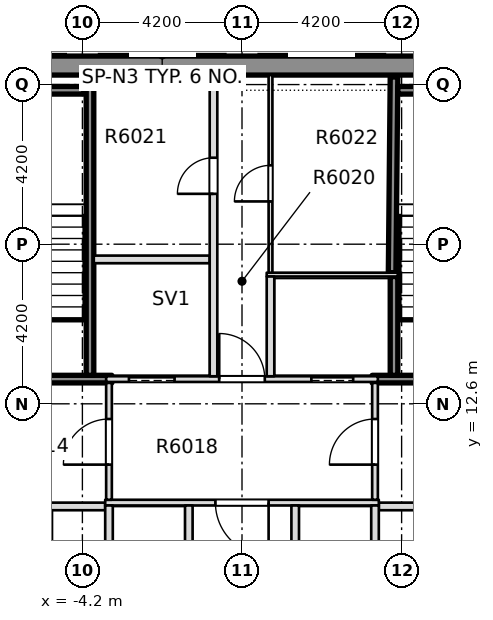
"""IFC4 building model, lengths in metres.
Left out: names, types, materials, properties, quantities, classifications, styles, units other than length and angle.
Written with IfcOpenShell. Run it as: python <this file> out.ifc"""

import sys

from ifc_helpers import new_model, si_unit, direction, frame, frame_2d, origin, place, context, subcontext, project, spatial, rectangle, extrude, element, fill, save


model = new_model("IFC4")
c1 = context("Model", 3, precision=1e-05, world=origin(), true_north=direction((0.0, 1.0)))
c2 = subcontext(c1, "Body", "Model", "MODEL_VIEW")
j1 = project(units=[si_unit("LENGTHUNIT", "METRE"), si_unit("PLANEANGLEUNIT", "RADIAN")], contexts=[c1])
p1 = place(None, origin())
s1 = spatial("IfcSite", under=j1, at=p1, CompositionType="ELEMENT")
p2 = place(p1, origin())
s2 = spatial("IfcBuilding", under=s1, at=p2, CompositionType="ELEMENT")
p3 = place(p2, frame((0.0, 0.0, 230.35)))
s3 = spatial("IfcBuildingStorey", under=s2, at=p3, CompositionType="ELEMENT", Elevation=230.35)
p4 = place(p3, frame((-12.1, 21.5, -0.4), z_axis=(0.0, 0.0, 1.0), x_axis=(1.0, 0.0, 0.0)))
e1 = element("IfcWall", 1, at=p4, inside=s3, PredefinedType="SHEAR", context=c2, shape_type="SweptSolid", body=[
    extrude(rectangle(XDim=24.2, YDim=0.5, at=frame_2d((12.1, 0.0))), origin(), (0.0, 0.0, 1.0), 3.45),
])
p5 = place(p3, frame((-7.5, 9.9, 0.0), z_axis=(0.0, 0.0, 1.0), x_axis=(1.0, 0.0, 0.0)))
e2 = element("IfcWall", 2, at=p5, inside=s3, PredefinedType="PARTITIONING", context=c2, shape_type="SweptSolid", body=[
    extrude(rectangle(XDim=3.9, YDim=0.2, at=frame_2d((1.95, 0.0))), origin(), (0.0, 0.0, 1.0), 3.05),
])
p6 = place(p5, frame((0.55, 0.0, 0.0)))
e3 = element("IfcOpeningElement", 3, at=p6, cuts=e2, PredefinedType="OPENING", context=c2, shape_type="SweptSolid", body=[
    extrude(rectangle(XDim=1.1, YDim=2.1, at=frame_2d((0.55, 1.05))), frame((0.0, 0.11, 0.0), z_axis=(0.0, -1.0, 0.0), x_axis=(1.0, 0.0, 0.0)), (0.0, 0.0, 1.0), 0.22),
])
p7 = place(p3, frame((3.6, 9.9, 0.0), z_axis=(0.0, 0.0, 1.0), x_axis=(1.0, 0.0, 0.0)))
e4 = element("IfcWall", 4, at=p7, inside=s3, PredefinedType="PARTITIONING", context=c2, shape_type="SweptSolid", body=[
    extrude(rectangle(XDim=3.9, YDim=0.2, at=frame_2d((1.95, 0.0))), origin(), (0.0, 0.0, 1.0), 3.05),
])
p8 = place(p7, frame((2.25, 0.0, 0.0)))
e5 = element("IfcOpeningElement", 5, at=p8, cuts=e4, PredefinedType="OPENING", context=c2, shape_type="SweptSolid", body=[
    extrude(rectangle(XDim=1.1, YDim=2.1, at=frame_2d((0.55, 1.05))), frame((0.0, 0.11, 0.0), z_axis=(0.0, -1.0, 0.0), x_axis=(1.0, 0.0, 0.0)), (0.0, 0.0, 1.0), 0.22),
])
p9 = place(p3, frame((-3.6, 10.0, 0.0), z_axis=(0.0, 0.0, 1.0), x_axis=(1.0, 0.0, 0.0)))
e6 = element("IfcWall", 6, at=p9, inside=s3, PredefinedType="PARTITIONING", context=c2, shape_type="SweptSolid", body=[
    extrude(rectangle(XDim=7.2, YDim=0.15, at=frame_2d((3.6, 0.0))), origin(), (0.0, 0.0, 1.0), 3.05),
])
p10 = place(p9, frame((2.9, 0.0, 0.0)))
e7 = element("IfcOpeningElement", 7, at=p10, cuts=e6, PredefinedType="OPENING", context=c2, shape_type="SweptSolid", body=[
    extrude(rectangle(XDim=1.4, YDim=2.1, at=frame_2d((0.7, 1.05))), frame((0.0, 0.085, 0.0), z_axis=(0.0, -1.0, 0.0), x_axis=(1.0, 0.0, 0.0)), (0.0, 0.0, 1.0), 0.17),
])
p11 = place(p3, frame((-7.5, 13.25, 0.0), z_axis=(0.0, 0.0, 1.0), x_axis=(1.0, 0.0, 0.0)))
e8 = element("IfcWall", 8, at=p11, inside=s3, PredefinedType="SOLIDWALL", context=c2, shape_type="SweptSolid", body=[
    extrude(rectangle(XDim=4.075, YDim=0.2, at=frame_2d((2.038, 0.0))), origin(), (0.0, 0.0, 1.0), 3.05),
])
p12 = place(p11, frame((1.05, 0.0, 0.0)))
e9 = element("IfcOpeningElement", 9, at=p12, cuts=e8, PredefinedType="OPENING", context=c2, shape_type="SweptSolid", body=[
    extrude(rectangle(XDim=1.2, YDim=2.1, at=frame_2d((0.6, 1.05))), frame((0.0, 0.11, 0.0), z_axis=(0.0, -1.0, 0.0), x_axis=(1.0, 0.0, 0.0)), (0.0, 0.0, 1.0), 0.22),
])
p13 = place(p3, frame((-3.575, 13.25, 0.0), z_axis=(0.0, 0.0, 1.0), x_axis=(1.0, 0.0, 0.0)))
e10 = element("IfcWall", 10, at=p13, inside=s3, PredefinedType="PARTITIONING", context=c2, shape_type="SweptSolid", body=[
    extrude(rectangle(XDim=7.15, YDim=0.15, at=frame_2d((3.575, 0.0))), origin(), (0.0, 0.0, 1.0), 3.05),
])
p14 = place(p13, frame((0.6, 0.0, 0.0)))
e11 = element("IfcOpeningElement", 11, at=p14, cuts=e10, PredefinedType="OPENING", context=c2, shape_type="SweptSolid", body=[
    extrude(rectangle(XDim=1.2, YDim=2.1, at=frame_2d((0.6, 1.05))), frame((0.0, 0.085, 0.0), z_axis=(0.0, -1.0, 0.0), x_axis=(1.0, 0.0, 0.0)), (0.0, 0.0, 1.0), 0.17),
])
p15 = place(p13, frame((5.4, 0.0, 0.0)))
e12 = element("IfcOpeningElement", 12, at=p15, cuts=e10, PredefinedType="OPENING", context=c2, shape_type="SweptSolid", body=[
    extrude(rectangle(XDim=1.1, YDim=2.1, at=frame_2d((0.55, 1.05))), frame((0.0, 0.085, 0.0), z_axis=(0.0, -1.0, 0.0), x_axis=(1.0, 0.0, 0.0)), (0.0, 0.0, 1.0), 0.17),
])
p16 = place(p13, frame((2.975, 0.0, 0.0)))
e13 = element("IfcOpeningElement", 13, at=p16, cuts=e10, PredefinedType="OPENING", context=c2, shape_type="SweptSolid", body=[
    extrude(rectangle(XDim=1.2, YDim=2.1, at=frame_2d((0.6, 1.05))), frame((0.0, 0.085, 0.0), z_axis=(0.0, -1.0, 0.0), x_axis=(1.0, 0.0, 0.0)), (0.0, 0.0, 1.0), 0.17),
])
p17 = place(p3, frame((3.425, 13.25, 0.0), z_axis=(0.0, 0.0, 1.0), x_axis=(1.0, 0.0, 0.0)))
e14 = element("IfcWall", 14, at=p17, inside=s3, PredefinedType="SOLIDWALL", context=c2, shape_type="SweptSolid", body=[
    extrude(rectangle(XDim=4.075, YDim=0.2, at=frame_2d((2.038, 0.0))), origin(), (0.0, 0.0, 1.0), 3.05),
])
p18 = place(p17, frame((1.825, 0.0, 0.0)))
e15 = element("IfcOpeningElement", 15, at=p18, cuts=e14, PredefinedType="OPENING", context=c2, shape_type="SweptSolid", body=[
    extrude(rectangle(XDim=1.2, YDim=2.1, at=frame_2d((0.6, 1.05))), frame((0.0, 0.11, 0.0), z_axis=(0.0, -1.0, 0.0), x_axis=(1.0, 0.0, 0.0)), (0.0, 0.0, 1.0), 0.22),
])
p19 = place(p3, frame((0.65, 16.0, 0.0), z_axis=(0.0, 0.0, 1.0), x_axis=(1.0, 0.0, 0.0)))
e16 = element("IfcWall", 16, at=p19, inside=s3, PredefinedType="PARTITIONING", context=c2, shape_type="SweptSolid", body=[
    extrude(rectangle(XDim=3.45, YDim=0.1, at=frame_2d((1.725, 0.0))), origin(), (0.0, 0.0, 1.0), 3.05),
])
p20 = place(p3, frame((-3.9, 16.4, 0.0), z_axis=(0.0, 0.0, 1.0), x_axis=(1.0, 0.0, 0.0)))
e17 = element("IfcWall", 17, at=p20, inside=s3, PredefinedType="PARTITIONING", context=c2, shape_type="SweptSolid", body=[
    extrude(rectangle(XDim=3.05, YDim=0.2, at=frame_2d((1.525, 0.0))), origin(), (0.0, 0.0, 1.0), 3.05),
])
p21 = place(p3, frame((-4.0, 13.35, 0.0), z_axis=(0.0, 0.0, 1.0), x_axis=(0.0, 1.0, 0.0)))
e18 = element("IfcWall", 18, at=p21, inside=s3, PredefinedType="SOLIDWALL", context=c2, shape_type="SweptSolid", body=[
    extrude(rectangle(XDim=7.899, YDim=0.2, at=frame_2d((3.949, 0.0))), origin(), (0.0, 0.0, 1.0), 3.05),
])
p22 = place(p3, frame((-3.5, 7.075, 0.0), z_axis=(0.0, 0.0, 1.0), x_axis=(0.0, 1.0, 0.0)))
e19 = element("IfcWall", 19, at=p22, inside=s3, PredefinedType="PARTITIONING", context=c2, shape_type="SweptSolid", body=[
    extrude(rectangle(XDim=2.85, YDim=0.2, at=frame_2d((1.425, 0.0))), origin(), (0.0, 0.0, 1.0), 3.05),
])
p23 = place(p3, frame((-3.5, 10.075, 0.0), z_axis=(0.0, 0.0, 1.0), x_axis=(0.0, 1.0, 0.0)))
e20 = element("IfcWall", 20, at=p23, inside=s3, PredefinedType="PARTITIONING", context=c2, shape_type="SweptSolid", body=[
    extrude(rectangle(XDim=3.075, YDim=0.15, at=frame_2d((1.538, 0.0))), origin(), (0.0, 0.0, 1.0), 3.05),
])
p24 = place(p23, frame((0.925, 0.0, 0.0)))
e21 = element("IfcOpeningElement", 21, at=p24, cuts=e20, PredefinedType="OPENING", context=c2, shape_type="SweptSolid", body=[
    extrude(rectangle(XDim=1.2, YDim=2.1, at=frame_2d((0.6, 1.05))), frame((0.0, 0.085, 0.0), z_axis=(0.0, -1.0, 0.0), x_axis=(1.0, 0.0, 0.0)), (0.0, 0.0, 1.0), 0.17),
])
p25 = place(p3, frame((-1.4, 7.075, 0.0), z_axis=(0.0, 0.0, 1.0), x_axis=(0.0, 1.0, 0.0)))
e22 = element("IfcWall", 22, at=p25, inside=s3, PredefinedType="PARTITIONING", context=c2, shape_type="SweptSolid", body=[
    extrude(rectangle(XDim=2.85, YDim=0.2, at=frame_2d((1.425, 0.0))), origin(), (0.0, 0.0, 1.0), 3.05),
])
p26 = place(p3, frame((-0.75, 13.325, 0.0), z_axis=(0.0, 0.0, 1.0), x_axis=(0.0, 1.0, 0.0)))
e23 = element("IfcWall", 23, at=p26, inside=s3, PredefinedType="PARTITIONING", context=c2, shape_type="SweptSolid", body=[
    extrude(rectangle(XDim=7.924, YDim=0.2, at=frame_2d((3.962, 0.0))), origin(), (0.0, 0.0, 1.0), 3.05),
])
p27 = place(p26, frame((4.8, 0.0, 0.0)))
e24 = element("IfcOpeningElement", 24, at=p27, cuts=e23, PredefinedType="OPENING", context=c2, shape_type="SweptSolid", body=[
    extrude(rectangle(XDim=0.95, YDim=2.1, at=frame_2d((0.475, 1.05))), frame((0.0, 0.11, 0.0), z_axis=(0.0, -1.0, 0.0), x_axis=(1.0, 0.0, 0.0)), (0.0, 0.0, 1.0), 0.22),
])
p28 = place(p3, frame((0.75, 13.325, 0.0), z_axis=(0.0, 0.0, 1.0), x_axis=(0.0, 1.0, 0.0)))
e25 = element("IfcWall", 25, at=p28, inside=s3, PredefinedType="PARTITIONING", context=c2, shape_type="SweptSolid", body=[
    extrude(rectangle(XDim=2.625, YDim=0.2, at=frame_2d((1.312, 0.0))), origin(), (0.0, 0.0, 1.0), 3.05),
])
p29 = place(p3, frame((0.75, 16.05, 0.0), z_axis=(0.0, 0.0, 1.0), x_axis=(0.0, 1.0, 0.0)))
e26 = element("IfcWall", 26, at=p29, inside=s3, PredefinedType="PARTITIONING", context=c2, shape_type="SweptSolid", body=[
    extrude(rectangle(XDim=5.199, YDim=0.1, at=frame_2d((2.6, 0.0))), origin(), (0.0, 0.0, 1.0), 3.05),
])
p30 = place(p29, frame((1.875, 0.0, 0.0)))
e27 = element("IfcOpeningElement", 27, at=p30, cuts=e26, PredefinedType="OPENING", context=c2, shape_type="SweptSolid", body=[
    extrude(rectangle(XDim=0.95, YDim=2.1, at=frame_2d((0.475, 1.05))), frame((0.0, 0.06, 0.0), z_axis=(0.0, -1.0, 0.0), x_axis=(1.0, 0.0, 0.0)), (0.0, 0.0, 1.0), 0.12),
])
for number, where, z_axis, x_axis in (
    (28, (1.4, 7.075, 0.0), (0.0, 0.0, 1.0), (0.0, 1.0, 0.0)),
    (29, (3.5, 7.075, 0.0), (0.0, 0.0, 1.0), (0.0, 1.0, 0.0)),
):
    element("IfcWall", number, at=place(p3, frame(where, z_axis=z_axis, x_axis=x_axis)), inside=s3, PredefinedType="PARTITIONING", context=c2, shape_type="SweptSolid", body=[
        extrude(rectangle(XDim=2.85, YDim=0.2, at=frame_2d((1.425, 0.0))), origin(), (0.0, 0.0, 1.0), 3.05),
    ])
p31 = place(p3, frame((3.5, 10.075, 0.0), z_axis=(0.0, 0.0, 1.0), x_axis=(0.0, 1.0, 0.0)))
e30 = element("IfcWall", 30, at=p31, inside=s3, PredefinedType="PARTITIONING", context=c2, shape_type="SweptSolid", body=[
    extrude(rectangle(XDim=3.075, YDim=0.15, at=frame_2d((1.538, 0.0))), origin(), (0.0, 0.0, 1.0), 3.05),
])
p32 = place(p31, frame((0.925, 0.0, 0.0)))
e31 = element("IfcOpeningElement", 31, at=p32, cuts=e30, PredefinedType="OPENING", context=c2, shape_type="SweptSolid", body=[
    extrude(rectangle(XDim=1.2, YDim=2.1, at=frame_2d((0.6, 1.05))), frame((0.0, 0.085, 0.0), z_axis=(0.0, -1.0, 0.0), x_axis=(1.0, 0.0, 0.0)), (0.0, 0.0, 1.0), 0.17),
])
p33 = place(p3, frame((4.0, 13.35, 0.0), z_axis=(0.0, 0.0, 1.0), x_axis=(0.0, 1.0, 0.0)))
e32 = element("IfcWall", 32, at=p33, inside=s3, PredefinedType="SOLIDWALL", context=c2, shape_type="SweptSolid", body=[
    extrude(rectangle(XDim=2.6, YDim=0.2, at=frame_2d((1.3, 0.0))), origin(), (0.0, 0.0, 1.0), 3.05),
])
p34 = place(p3, frame((3.95, 16.05, 0.0), z_axis=(0.0, 0.0, 1.0), x_axis=(0.009719787395, 0.999952761751, 0.0)))
e33 = element("IfcWall", 33, at=p34, inside=s3, PredefinedType="SOLIDWALL", context=c2, shape_type="SweptSolid", body=[
    extrude(rectangle(XDim=5.149, YDim=0.2, at=frame_2d((2.575, 0.0))), origin(), (0.0, 0.0, 1.0), 3.05),
])
p35 = place(p3, frame((-7.7, 20.85, 0.0), z_axis=(0.0, 0.0, 1.0), x_axis=(1.0, 0.0, 0.0)))
e34 = element("IfcWall", 34, at=p35, inside=s3, PredefinedType="SOLIDWALL", context=c2, shape_type="SweptSolid", body=[
    extrude(rectangle(XDim=3.55, YDim=0.2, at=frame_2d((1.775, 0.0))), origin(), (0.0, 0.0, 1.0), 3.05),
])
p36 = place(p3, frame((4.1, 20.85, 0.0), z_axis=(0.0, 0.0, 1.0), x_axis=(1.0, 0.0, 0.0)))
e35 = element("IfcWall", 35, at=p36, inside=s3, PredefinedType="SOLIDWALL", context=c2, shape_type="SweptSolid", body=[
    extrude(rectangle(XDim=3.6, YDim=0.2, at=frame_2d((1.8, 0.0))), origin(), (0.0, 0.0, 1.0), 3.05),
])
p37 = place(p10, origin())
e36 = element("IfcDoor", 36, at=p37, inside=s3, OperationType="SINGLE_SWING_RIGHT", PredefinedType="DOOR", context=c2, shape_type="SweptSolid", body=[
    extrude(rectangle(XDim=1.4, YDim=2.1, at=frame_2d((0.7, 1.05))), frame((0.0, 0.025, 0.0), z_axis=(0.0, -1.0, 0.0), x_axis=(1.0, 0.0, 0.0)), (0.0, 0.0, 1.0), 0.05),
])
fill(e7, e36)
p38 = place(p14, origin())
e37 = element("IfcDoor", 37, at=p38, inside=s3, OperationType="SLIDING_TO_RIGHT", PredefinedType="DOOR", context=c2, shape_type="SweptSolid", body=[
    extrude(rectangle(XDim=1.2, YDim=2.1, at=frame_2d((0.6, 1.05))), frame((0.0, 0.025, 0.0), z_axis=(0.0, -1.0, 0.0), x_axis=(1.0, 0.0, 0.0)), (0.0, 0.0, 1.0), 0.05),
])
fill(e11, e37)
p39 = place(p15, origin())
e38 = element("IfcDoor", 38, at=p39, inside=s3, OperationType="SLIDING_TO_LEFT", PredefinedType="DOOR", context=c2, shape_type="SweptSolid", body=[
    extrude(rectangle(XDim=1.1, YDim=2.1, at=frame_2d((0.55, 1.05))), frame((0.0, 0.025, 0.0), z_axis=(0.0, -1.0, 0.0), x_axis=(1.0, 0.0, 0.0)), (0.0, 0.0, 1.0), 0.05),
])
fill(e12, e38)
p40 = place(p16, origin())
e39 = element("IfcDoor", 39, at=p40, inside=s3, OperationType="SINGLE_SWING_RIGHT", PredefinedType="DOOR", context=c2, shape_type="SweptSolid", body=[
    extrude(rectangle(XDim=1.2, YDim=2.1, at=frame_2d((0.6, 1.05))), frame((0.0, 0.025, 0.0), z_axis=(0.0, -1.0, 0.0), x_axis=(1.0, 0.0, 0.0)), (0.0, 0.0, 1.0), 0.05),
])
fill(e13, e39)
p41 = place(p27, origin())
e40 = element("IfcDoor", 40, at=p41, inside=s3, OperationType="SINGLE_SWING_RIGHT", PredefinedType="DOOR", context=c2, shape_type="SweptSolid", body=[
    extrude(rectangle(XDim=0.95, YDim=2.1, at=frame_2d((0.475, 1.05))), frame((0.0, 0.025, 0.0), z_axis=(0.0, -1.0, 0.0), x_axis=(1.0, 0.0, 0.0)), (0.0, 0.0, 1.0), 0.05),
])
fill(e24, e40)
p42 = place(p30, origin())
e41 = element("IfcDoor", 41, at=p42, inside=s3, OperationType="SINGLE_SWING_LEFT", PredefinedType="DOOR", context=c2, shape_type="SweptSolid", body=[
    extrude(rectangle(XDim=0.95, YDim=2.1, at=frame_2d((0.475, 1.05))), frame((0.0, 0.025, 0.0), z_axis=(0.0, -1.0, 0.0), x_axis=(1.0, 0.0, 0.0)), (0.0, 0.0, 1.0), 0.05),
])
fill(e27, e41)
p43 = place(p24, origin())
e42 = element("IfcDoor", 42, at=p43, inside=s3, OperationType="SINGLE_SWING_RIGHT", PredefinedType="DOOR", context=c2, shape_type="SweptSolid", body=[
    extrude(rectangle(XDim=1.2, YDim=2.1, at=frame_2d((0.6, 1.05))), frame((0.0, 0.025, 0.0), z_axis=(0.0, -1.0, 0.0), x_axis=(1.0, 0.0, 0.0)), (0.0, 0.0, 1.0), 0.05),
])
fill(e21, e42)
p44 = place(p32, origin())
e43 = element("IfcDoor", 43, at=p44, inside=s3, OperationType="SINGLE_SWING_LEFT", PredefinedType="DOOR", context=c2, shape_type="SweptSolid", body=[
    extrude(rectangle(XDim=1.2, YDim=2.1, at=frame_2d((0.6, 1.05))), frame((0.0, 0.025, 0.0), z_axis=(0.0, -1.0, 0.0), x_axis=(1.0, 0.0, 0.0)), (0.0, 0.0, 1.0), 0.05),
])
fill(e31, e43)
save(model, sys.argv[1])
